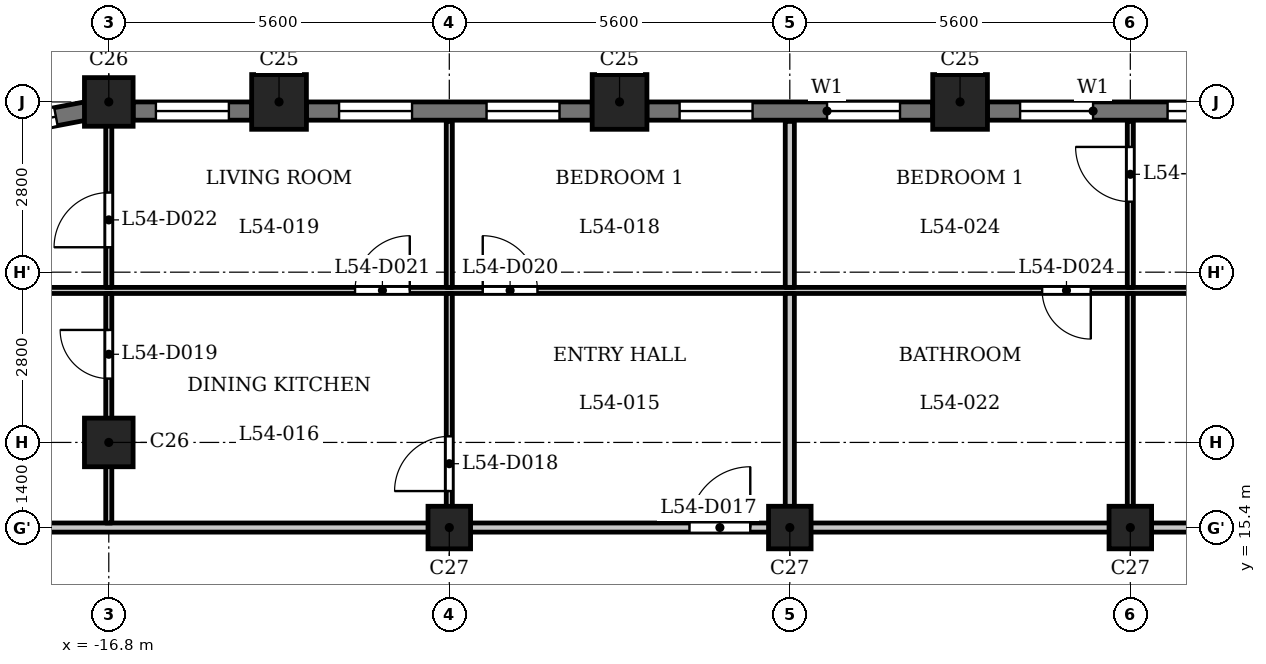
"""IFC4 building model, lengths in metres.
Left out: names, types, materials, properties, quantities, classifications, styles, units other than length and angle.
Written with IfcOpenShell. Run it as: python <this file> out.ifc"""

import sys

from ifc_helpers import new_model, si_unit, direction, frame, frame_2d, origin, origin_2d, place, context, subcontext, project, spatial, rectangle, extrude, element, fill, save


model = new_model("IFC4")
c1 = context("Model", 3, precision=1e-05, world=origin(), true_north=direction((0.0, 1.0)))
c2 = subcontext(c1, "Body", "Model", "MODEL_VIEW")
j1 = project(units=[si_unit("LENGTHUNIT", "METRE"), si_unit("PLANEANGLEUNIT", "RADIAN")], contexts=[c1])
p1 = place(None, origin())
s1 = spatial("IfcSite", under=j1, at=p1, CompositionType="ELEMENT")
p2 = place(p1, origin())
s2 = spatial("IfcBuilding", under=s1, at=p2, CompositionType="ELEMENT")
p3 = place(p2, frame((0.0, 0.0, 209.9)))
s3 = spatial("IfcBuildingStorey", under=s2, at=p3, CompositionType="ELEMENT", Elevation=209.9)
for number, where, z_axis, x_axis in (
    (1, (-2.8, 22.4, 0.0), (0.0, 0.0, 1.0), (1.0, 0.0, 0.0)),
    (2, (-8.4, 22.4, 0.0), (0.0, 0.0, 1.0), (1.0, 0.0, 0.0)),
    (3, (-14.0, 22.4, 0.0), (0.0, 0.0, 1.0), (1.0, 0.0, 0.0)),
):
    element("IfcColumn", number, at=place(p3, frame(where, z_axis=z_axis, x_axis=x_axis)), inside=s3, PredefinedType="COLUMN", context=c2, shape_type="SweptSolid", body=[
        extrude(rectangle(XDim=0.9, YDim=0.9, at=origin_2d()), origin(), (0.0, 0.0, 1.0), 3.5),
    ])
for number, where, z_axis, x_axis in (
    (4, (-16.8, 16.8, 0.0), (0.0, 0.0, 1.0), (1.0, 0.0, 0.0)),
    (5, (-16.8, 22.4, 0.0), (0.0, 0.0, 1.0), (1.0, 0.0, 0.0)),
):
    element("IfcColumn", number, at=place(p3, frame(where, z_axis=z_axis, x_axis=x_axis)), inside=s3, PredefinedType="COLUMN", context=c2, shape_type="SweptSolid", body=[
        extrude(rectangle(XDim=0.8, YDim=0.8, at=origin_2d()), origin(), (0.0, 0.0, 1.0), 3.5),
    ])
for number, where, z_axis, x_axis in (
    (6, (-11.2, 15.4, 0.0), (0.0, 0.0, 1.0), (1.0, 0.0, 0.0)),
    (7, (-5.6, 15.4, 0.0), (0.0, 0.0, 1.0), (1.0, 0.0, 0.0)),
    (8, (0.0, 15.4, 0.0), (0.0, 0.0, 1.0), (1.0, 0.0, 0.0)),
):
    element("IfcColumn", number, at=place(p3, frame(where, z_axis=z_axis, x_axis=x_axis)), inside=s3, PredefinedType="COLUMN", context=c2, shape_type="SweptSolid", body=[
        extrude(rectangle(XDim=0.7, YDim=0.7, at=origin_2d()), origin(), (0.0, 0.0, 1.0), 3.5),
    ])
p4 = place(p3, frame((2.35, 22.25, 0.0), z_axis=(0.0, 0.0, 1.0), x_axis=(-1.0, 0.0, 0.0)))
e9 = element("IfcWall", 9, at=p4, inside=s3, PredefinedType="SOLIDWALL", context=c2, shape_type="SweptSolid", body=[
    extrude(rectangle(XDim=4.7, YDim=0.3, at=frame_2d((2.35, 0.0))), origin(), (0.0, 0.0, 1.0), 2.5),
])
p5 = place(p4, frame((0.538, 0.0, 0.6)))
e10 = element("IfcOpeningElement", 10, at=p5, cuts=e9, PredefinedType="OPENING", context=c2, shape_type="SweptSolid", body=[
    extrude(rectangle(XDim=1.2, YDim=1.55, at=frame_2d((0.6, 0.775))), frame((0.0, 0.16, 0.0), z_axis=(0.0, -1.0, 0.0), x_axis=(1.0, 0.0, 0.0)), (0.0, 0.0, 1.0), 0.32),
])
p6 = place(p4, frame((2.962, 0.0, 0.6)))
e11 = element("IfcOpeningElement", 11, at=p6, cuts=e9, PredefinedType="OPENING", context=c2, shape_type="SweptSolid", body=[
    extrude(rectangle(XDim=1.2, YDim=1.55, at=frame_2d((0.6, 0.775))), frame((0.0, 0.16, 0.0), z_axis=(0.0, -1.0, 0.0), x_axis=(1.0, 0.0, 0.0)), (0.0, 0.0, 1.0), 0.32),
])
p7 = place(p3, frame((-3.25, 22.25, 0.0), z_axis=(0.0, 0.0, 1.0), x_axis=(-1.0, 0.0, 0.0)))
e12 = element("IfcWall", 12, at=p7, inside=s3, PredefinedType="SOLIDWALL", context=c2, shape_type="SweptSolid", body=[
    extrude(rectangle(XDim=4.7, YDim=0.3, at=frame_2d((2.35, 0.0))), origin(), (0.0, 0.0, 1.0), 2.5),
])
p8 = place(p7, frame((0.538, 0.0, 0.6)))
e13 = element("IfcOpeningElement", 13, at=p8, cuts=e12, PredefinedType="OPENING", context=c2, shape_type="SweptSolid", body=[
    extrude(rectangle(XDim=1.2, YDim=1.55, at=frame_2d((0.6, 0.775))), frame((0.0, 0.16, 0.0), z_axis=(0.0, -1.0, 0.0), x_axis=(1.0, 0.0, 0.0)), (0.0, 0.0, 1.0), 0.32),
])
p9 = place(p7, frame((2.962, 0.0, 0.6)))
e14 = element("IfcOpeningElement", 14, at=p9, cuts=e12, PredefinedType="OPENING", context=c2, shape_type="SweptSolid", body=[
    extrude(rectangle(XDim=1.2, YDim=1.55, at=frame_2d((0.6, 0.775))), frame((0.0, 0.16, 0.0), z_axis=(0.0, -1.0, 0.0), x_axis=(1.0, 0.0, 0.0)), (0.0, 0.0, 1.0), 0.32),
])
p10 = place(p3, frame((-8.85, 22.25, 0.0), z_axis=(0.0, 0.0, 1.0), x_axis=(-1.0, 0.0, 0.0)))
e15 = element("IfcWall", 15, at=p10, inside=s3, PredefinedType="SOLIDWALL", context=c2, shape_type="SweptSolid", body=[
    extrude(rectangle(XDim=4.7, YDim=0.3, at=frame_2d((2.35, 0.0))), origin(), (0.0, 0.0, 1.0), 2.5),
])
p11 = place(p10, frame((0.538, 0.0, 0.6)))
e16 = element("IfcOpeningElement", 16, at=p11, cuts=e15, PredefinedType="OPENING", context=c2, shape_type="SweptSolid", body=[
    extrude(rectangle(XDim=1.2, YDim=1.55, at=frame_2d((0.6, 0.775))), frame((0.0, 0.16, 0.0), z_axis=(0.0, -1.0, 0.0), x_axis=(1.0, 0.0, 0.0)), (0.0, 0.0, 1.0), 0.32),
])
p12 = place(p10, frame((2.962, 0.0, 0.6)))
e17 = element("IfcOpeningElement", 17, at=p12, cuts=e15, PredefinedType="OPENING", context=c2, shape_type="SweptSolid", body=[
    extrude(rectangle(XDim=1.2, YDim=1.55, at=frame_2d((0.6, 0.775))), frame((0.0, 0.16, 0.0), z_axis=(0.0, -1.0, 0.0), x_axis=(1.0, 0.0, 0.0)), (0.0, 0.0, 1.0), 0.32),
])
p13 = place(p3, frame((-14.45, 22.25, 0.0), z_axis=(0.0, 0.0, 1.0), x_axis=(-1.0, 0.0, 0.0)))
e18 = element("IfcWall", 18, at=p13, inside=s3, PredefinedType="SOLIDWALL", context=c2, shape_type="SweptSolid", body=[
    extrude(rectangle(XDim=1.95, YDim=0.3, at=frame_2d((0.975, 0.0))), origin(), (0.0, 0.0, 1.0), 2.5),
])
p14 = place(p13, frame((0.375, 0.0, 0.6)))
e19 = element("IfcOpeningElement", 19, at=p14, cuts=e18, PredefinedType="OPENING", context=c2, shape_type="SweptSolid", body=[
    extrude(rectangle(XDim=1.2, YDim=1.55, at=frame_2d((0.6, 0.775))), frame((0.0, 0.16, 0.0), z_axis=(0.0, -1.0, 0.0), x_axis=(1.0, 0.0, 0.0)), (0.0, 0.0, 1.0), 0.32),
])
p15 = place(p3, frame((-17.179, 22.251, 0.0), z_axis=(0.0, 0.0, 1.0), x_axis=(-0.98230529033, -0.187286722942, 0.0)))
e20 = element("IfcWall", 20, at=p15, inside=s3, PredefinedType="SOLIDWALL", context=c2, shape_type="SweptSolid", body=[
    extrude(rectangle(XDim=1.799, YDim=0.3, at=frame_2d((0.899, 0.0))), origin(), (0.0, 0.0, 1.0), 2.5),
])
p16 = place(p15, frame((0.5, 0.0, 0.6)))
e21 = element("IfcOpeningElement", 21, at=p16, cuts=e20, PredefinedType="OPENING", context=c2, shape_type="SweptSolid", body=[
    extrude(rectangle(XDim=0.8, YDim=1.55, at=frame_2d((0.4, 0.775))), frame((0.0, 0.16, 0.0), z_axis=(0.0, -1.0, 0.0), x_axis=(1.0, 0.0, 0.0)), (0.0, 0.0, 1.0), 0.32),
])
p17 = place(p3, frame((-24.684, 15.4, 0.0), z_axis=(0.0, 0.0, 1.0), x_axis=(1.0, 0.0, 0.0)))
e22 = element("IfcWall", 22, at=p17, inside=s3, PredefinedType="PARTITIONING", context=c2, shape_type="SweptSolid", body=[
    extrude(rectangle(XDim=49.368, YDim=0.15, at=frame_2d((24.684, 0.0))), origin(), (0.0, 0.0, 1.0), 3.2),
])
p18 = place(p17, frame((17.434, 0.0, 0.0)))
e23 = element("IfcOpeningElement", 23, at=p18, cuts=e22, PredefinedType="OPENING", context=c2, shape_type="SweptSolid", body=[
    extrude(rectangle(XDim=1.0, YDim=2.1, at=frame_2d((0.5, 1.05))), frame((0.0, 0.085, 0.0), z_axis=(0.0, -1.0, 0.0), x_axis=(1.0, 0.0, 0.0)), (0.0, 0.0, 1.0), 0.17),
])
p19 = place(p17, frame((28.634, 0.0, 0.0)))
e24 = element("IfcOpeningElement", 24, at=p19, cuts=e22, PredefinedType="OPENING", context=c2, shape_type="SweptSolid", body=[
    extrude(rectangle(XDim=1.0, YDim=2.1, at=frame_2d((0.5, 1.05))), frame((0.0, 0.085, 0.0), z_axis=(0.0, -1.0, 0.0), x_axis=(1.0, 0.0, 0.0)), (0.0, 0.0, 1.0), 0.17),
])
p20 = place(p17, frame((47.225, 0.0, 0.0)))
e25 = element("IfcOpeningElement", 25, at=p20, cuts=e22, PredefinedType="OPENING", context=c2, shape_type="SweptSolid", body=[
    extrude(rectangle(XDim=1.0, YDim=2.1, at=frame_2d((0.5, 1.05))), frame((0.0, 0.085, 0.0), z_axis=(0.0, -1.0, 0.0), x_axis=(1.0, 0.0, 0.0)), (0.0, 0.0, 1.0), 0.17),
])
p21 = place(p3, frame((-22.256, 19.3, 0.0), z_axis=(0.0, 0.0, 1.0), x_axis=(1.0, 0.0, 0.0)))
e26 = element("IfcWall", 26, at=p21, inside=s3, PredefinedType="PARTITIONING", context=c2, shape_type="SweptSolid", body=[
    extrude(rectangle(XDim=44.511, YDim=0.1, at=frame_2d((22.256, 0.0))), origin(), (0.0, 0.0, 1.0), 3.2),
])
p22 = place(p21, frame((11.606, 0.0, 0.0)))
e27 = element("IfcOpeningElement", 27, at=p22, cuts=e26, PredefinedType="OPENING", context=c2, shape_type="SweptSolid", body=[
    extrude(rectangle(XDim=0.9, YDim=2.1, at=frame_2d((0.45, 1.05))), frame((0.0, 0.06, 0.0), z_axis=(0.0, -1.0, 0.0), x_axis=(1.0, 0.0, 0.0)), (0.0, 0.0, 1.0), 0.12),
])
p23 = place(p21, frame((9.506, 0.0, 0.0)))
e28 = element("IfcOpeningElement", 28, at=p23, cuts=e26, PredefinedType="OPENING", context=c2, shape_type="SweptSolid", body=[
    extrude(rectangle(XDim=0.9, YDim=2.1, at=frame_2d((0.45, 1.05))), frame((0.0, 0.06, 0.0), z_axis=(0.0, -1.0, 0.0), x_axis=(1.0, 0.0, 0.0)), (0.0, 0.0, 1.0), 0.12),
])
p24 = place(p21, frame((20.806, 0.0, 0.0)))
e29 = element("IfcOpeningElement", 29, at=p24, cuts=e26, PredefinedType="OPENING", context=c2, shape_type="SweptSolid", body=[
    extrude(rectangle(XDim=0.8, YDim=2.1, at=frame_2d((0.4, 1.05))), frame((0.0, 0.06, 0.0), z_axis=(0.0, -1.0, 0.0), x_axis=(1.0, 0.0, 0.0)), (0.0, 0.0, 1.0), 0.12),
])
p25 = place(p21, frame((26.306, 0.0, 0.0)))
e30 = element("IfcOpeningElement", 30, at=p25, cuts=e26, PredefinedType="OPENING", context=c2, shape_type="SweptSolid", body=[
    extrude(rectangle(XDim=0.9, YDim=2.1, at=frame_2d((0.45, 1.05))), frame((0.0, 0.06, 0.0), z_axis=(0.0, -1.0, 0.0), x_axis=(1.0, 0.0, 0.0)), (0.0, 0.0, 1.0), 0.12),
])
p26 = place(p21, frame((40.278, 0.0, 0.0)))
e31 = element("IfcOpeningElement", 31, at=p26, cuts=e26, PredefinedType="OPENING", context=c2, shape_type="SweptSolid", body=[
    extrude(rectangle(XDim=0.9, YDim=2.1, at=frame_2d((0.45, 1.05))), frame((0.0, 0.06, 0.0), z_axis=(0.0, -1.0, 0.0), x_axis=(1.0, 0.0, 0.0)), (0.0, 0.0, 1.0), 0.12),
])
p27 = place(p21, frame((36.756, 0.0, 0.0)))
e32 = element("IfcOpeningElement", 32, at=p27, cuts=e26, PredefinedType="OPENING", context=c2, shape_type="SweptSolid", body=[
    extrude(rectangle(XDim=0.9, YDim=2.1, at=frame_2d((0.45, 1.05))), frame((0.0, 0.06, 0.0), z_axis=(0.0, -1.0, 0.0), x_axis=(1.0, 0.0, 0.0)), (0.0, 0.0, 1.0), 0.12),
])
p28 = place(p3, frame((-16.8, 15.475, 0.0), z_axis=(0.0, 0.0, 1.0), x_axis=(0.0, 1.0, 0.0)))
e33 = element("IfcWall", 33, at=p28, inside=s3, PredefinedType="PARTITIONING", context=c2, shape_type="SweptSolid", body=[
    extrude(rectangle(XDim=3.775, YDim=0.1, at=frame_2d((1.887, 0.0))), origin(), (0.0, 0.0, 1.0), 2.55),
])
p29 = place(p28, frame((2.375, 0.0, 0.0)))
e34 = element("IfcOpeningElement", 34, at=p29, cuts=e33, PredefinedType="OPENING", context=c2, shape_type="SweptSolid", body=[
    extrude(rectangle(XDim=0.8, YDim=2.1, at=frame_2d((0.4, 1.05))), frame((0.0, 0.06, 0.0), z_axis=(0.0, -1.0, 0.0), x_axis=(1.0, 0.0, 0.0)), (0.0, 0.0, 1.0), 0.12),
])
p30 = place(p3, frame((-16.8, 19.35, 0.0), z_axis=(0.0, 0.0, 1.0), x_axis=(0.0, 1.0, 0.0)))
e35 = element("IfcWall", 35, at=p30, inside=s3, PredefinedType="PARTITIONING", context=c2, shape_type="SweptSolid", body=[
    extrude(rectangle(XDim=2.96, YDim=0.1, at=frame_2d((1.48, 0.0))), origin(), (0.0, 0.0, 1.0), 2.55),
])
p31 = place(p30, frame((0.66, 0.0, 0.0)))
e36 = element("IfcOpeningElement", 36, at=p31, cuts=e35, PredefinedType="OPENING", context=c2, shape_type="SweptSolid", body=[
    extrude(rectangle(XDim=0.9, YDim=2.1, at=frame_2d((0.45, 1.05))), frame((0.0, 0.06, 0.0), z_axis=(0.0, -1.0, 0.0), x_axis=(1.0, 0.0, 0.0)), (0.0, 0.0, 1.0), 0.12),
])
p32 = place(p3, frame((-11.2, 15.475, 0.0), z_axis=(0.0, 0.0, 1.0), x_axis=(0.0, 1.0, 0.0)))
e37 = element("IfcWall", 37, at=p32, inside=s3, PredefinedType="PARTITIONING", context=c2, shape_type="SweptSolid", body=[
    extrude(rectangle(XDim=3.775, YDim=0.1, at=frame_2d((1.887, 0.0))), origin(), (0.0, 0.0, 1.0), 3.2),
])
p33 = place(p32, frame((0.525, 0.0, 0.0)))
e38 = element("IfcOpeningElement", 38, at=p33, cuts=e37, PredefinedType="OPENING", context=c2, shape_type="SweptSolid", body=[
    extrude(rectangle(XDim=0.9, YDim=2.1, at=frame_2d((0.45, 1.05))), frame((0.0, 0.06, 0.0), z_axis=(0.0, -1.0, 0.0), x_axis=(1.0, 0.0, 0.0)), (0.0, 0.0, 1.0), 0.12),
])
p34 = place(p3, frame((-11.2, 19.35, 0.0), z_axis=(0.0, 0.0, 1.0), x_axis=(0.0, 1.0, 0.0)))
e39 = element("IfcWall", 39, at=p34, inside=s3, PredefinedType="PARTITIONING", context=c2, shape_type="SweptSolid", body=[
    extrude(rectangle(XDim=2.73, YDim=0.1, at=frame_2d((1.365, 0.0))), origin(), (0.0, 0.0, 1.0), 3.2),
])
p35 = place(p3, frame((-5.6, 15.475, 0.0), z_axis=(0.0, 0.0, 1.0), x_axis=(0.0, 1.0, 0.0)))
e40 = element("IfcWall", 40, at=p35, inside=s3, PredefinedType="PARTITIONING", context=c2, shape_type="SweptSolid", body=[
    extrude(rectangle(XDim=3.775, YDim=0.15, at=frame_2d((1.887, 0.0))), origin(), (0.0, 0.0, 1.0), 3.2),
])
p36 = place(p3, frame((-5.6, 19.35, 0.0), z_axis=(0.0, 0.0, 1.0), x_axis=(0.0, 1.0, 0.0)))
e41 = element("IfcWall", 41, at=p36, inside=s3, PredefinedType="PARTITIONING", context=c2, shape_type="SweptSolid", body=[
    extrude(rectangle(XDim=2.73, YDim=0.15, at=frame_2d((1.365, 0.0))), origin(), (0.0, 0.0, 1.0), 3.2),
])
p37 = place(p3, frame((0.0, 15.475, 0.0), z_axis=(0.0, 0.0, 1.0), x_axis=(0.0, 1.0, 0.0)))
e42 = element("IfcWall", 42, at=p37, inside=s3, PredefinedType="PARTITIONING", context=c2, shape_type="SweptSolid", body=[
    extrude(rectangle(XDim=3.775, YDim=0.1, at=frame_2d((1.887, 0.0))), origin(), (0.0, 0.0, 1.0), 3.2),
])
p38 = place(p3, frame((0.0, 19.35, 0.0), z_axis=(0.0, 0.0, 1.0), x_axis=(0.0, 1.0, 0.0)))
e43 = element("IfcWall", 43, at=p38, inside=s3, PredefinedType="PARTITIONING", context=c2, shape_type="SweptSolid", body=[
    extrude(rectangle(XDim=2.73, YDim=0.1, at=frame_2d((1.365, 0.0))), origin(), (0.0, 0.0, 1.0), 3.2),
])
p39 = place(p38, frame((1.41, 0.0, 0.0)))
e44 = element("IfcOpeningElement", 44, at=p39, cuts=e43, PredefinedType="OPENING", context=c2, shape_type="SweptSolid", body=[
    extrude(rectangle(XDim=0.9, YDim=2.1, at=frame_2d((0.45, 1.05))), frame((0.0, 0.06, 0.0), z_axis=(0.0, -1.0, 0.0), x_axis=(1.0, 0.0, 0.0)), (0.0, 0.0, 1.0), 0.12),
])
p40 = place(p18, origin())
e45 = element("IfcDoor", 45, at=p40, inside=s3, OperationType="SINGLE_SWING_LEFT", PredefinedType="DOOR", context=c2, shape_type="SweptSolid", body=[
    extrude(rectangle(XDim=1.0, YDim=2.1, at=frame_2d((0.5, 1.05))), frame((0.0, 0.025, 0.0), z_axis=(0.0, -1.0, 0.0), x_axis=(1.0, 0.0, 0.0)), (0.0, 0.0, 1.0), 0.05),
])
fill(e23, e45)
p41 = place(p33, origin())
e46 = element("IfcDoor", 46, at=p41, inside=s3, OperationType="SINGLE_SWING_RIGHT", PredefinedType="DOOR", context=c2, shape_type="SweptSolid", body=[
    extrude(rectangle(XDim=0.9, YDim=2.1, at=frame_2d((0.45, 1.05))), frame((0.0, 0.025, 0.0), z_axis=(0.0, -1.0, 0.0), x_axis=(1.0, 0.0, 0.0)), (0.0, 0.0, 1.0), 0.05),
])
fill(e38, e46)
p42 = place(p29, origin())
e47 = element("IfcDoor", 47, at=p42, inside=s3, OperationType="SINGLE_SWING_LEFT", PredefinedType="DOOR", context=c2, shape_type="SweptSolid", body=[
    extrude(rectangle(XDim=0.8, YDim=2.1, at=frame_2d((0.4, 1.05))), frame((0.0, 0.025, 0.0), z_axis=(0.0, -1.0, 0.0), x_axis=(1.0, 0.0, 0.0)), (0.0, 0.0, 1.0), 0.05),
])
fill(e34, e47)
p43 = place(p22, origin())
e48 = element("IfcDoor", 48, at=p43, inside=s3, OperationType="SINGLE_SWING_RIGHT", PredefinedType="DOOR", context=c2, shape_type="SweptSolid", body=[
    extrude(rectangle(XDim=0.9, YDim=2.1, at=frame_2d((0.45, 1.05))), frame((0.0, 0.025, 0.0), z_axis=(0.0, -1.0, 0.0), x_axis=(1.0, 0.0, 0.0)), (0.0, 0.0, 1.0), 0.05),
])
fill(e27, e48)
p44 = place(p23, origin())
e49 = element("IfcDoor", 49, at=p44, inside=s3, OperationType="SINGLE_SWING_LEFT", PredefinedType="DOOR", context=c2, shape_type="SweptSolid", body=[
    extrude(rectangle(XDim=0.9, YDim=2.1, at=frame_2d((0.45, 1.05))), frame((0.0, 0.025, 0.0), z_axis=(0.0, -1.0, 0.0), x_axis=(1.0, 0.0, 0.0)), (0.0, 0.0, 1.0), 0.05),
])
fill(e28, e49)
p45 = place(p31, origin())
e50 = element("IfcDoor", 50, at=p45, inside=s3, OperationType="SINGLE_SWING_RIGHT", PredefinedType="DOOR", context=c2, shape_type="SweptSolid", body=[
    extrude(rectangle(XDim=0.9, YDim=2.1, at=frame_2d((0.45, 1.05))), frame((0.0, 0.025, 0.0), z_axis=(0.0, -1.0, 0.0), x_axis=(1.0, 0.0, 0.0)), (0.0, 0.0, 1.0), 0.05),
])
fill(e36, e50)
p46 = place(p24, origin())
e51 = element("IfcDoor", 51, at=p46, inside=s3, OperationType="SINGLE_SWING_RIGHT", PredefinedType="DOOR", context=c2, shape_type="SweptSolid", body=[
    extrude(rectangle(XDim=0.8, YDim=2.1, at=frame_2d((0.4, 1.05))), frame((0.0, 0.025, 0.0), z_axis=(0.0, -1.0, 0.0), x_axis=(1.0, 0.0, 0.0)), (0.0, 0.0, 1.0), 0.05),
])
fill(e29, e51)
p47 = place(p39, origin())
e52 = element("IfcDoor", 52, at=p47, inside=s3, OperationType="SINGLE_SWING_LEFT", PredefinedType="DOOR", context=c2, shape_type="SweptSolid", body=[
    extrude(rectangle(XDim=0.9, YDim=2.1, at=frame_2d((0.45, 1.05))), frame((0.0, 0.025, 0.0), z_axis=(0.0, -1.0, 0.0), x_axis=(1.0, 0.0, 0.0)), (0.0, 0.0, 1.0), 0.05),
])
fill(e44, e52)
p48 = place(p5, origin())
e53 = element("IfcWindow", 53, at=p48, inside=s3, PartitioningType="SINGLE_PANEL", PredefinedType="WINDOW", context=c2, shape_type="SweptSolid", body=[
    extrude(rectangle(XDim=1.2, YDim=1.55, at=frame_2d((0.6, 0.775))), frame((0.0, 0.03, 0.0), z_axis=(0.0, -1.0, 0.0), x_axis=(1.0, 0.0, 0.0)), (0.0, 0.0, 1.0), 0.06),
])
fill(e10, e53)
p49 = place(p6, origin())
e54 = element("IfcWindow", 54, at=p49, inside=s3, PartitioningType="SINGLE_PANEL", PredefinedType="WINDOW", context=c2, shape_type="SweptSolid", body=[
    extrude(rectangle(XDim=1.2, YDim=1.55, at=frame_2d((0.6, 0.775))), frame((0.0, 0.03, 0.0), z_axis=(0.0, -1.0, 0.0), x_axis=(1.0, 0.0, 0.0)), (0.0, 0.0, 1.0), 0.06),
])
fill(e11, e54)
p50 = place(p8, origin())
e55 = element("IfcWindow", 55, at=p50, inside=s3, PartitioningType="SINGLE_PANEL", PredefinedType="WINDOW", context=c2, shape_type="SweptSolid", body=[
    extrude(rectangle(XDim=1.2, YDim=1.55, at=frame_2d((0.6, 0.775))), frame((0.0, 0.03, 0.0), z_axis=(0.0, -1.0, 0.0), x_axis=(1.0, 0.0, 0.0)), (0.0, 0.0, 1.0), 0.06),
])
fill(e13, e55)
p51 = place(p9, origin())
e56 = element("IfcWindow", 56, at=p51, inside=s3, PartitioningType="SINGLE_PANEL", PredefinedType="WINDOW", context=c2, shape_type="SweptSolid", body=[
    extrude(rectangle(XDim=1.2, YDim=1.55, at=frame_2d((0.6, 0.775))), frame((0.0, 0.03, 0.0), z_axis=(0.0, -1.0, 0.0), x_axis=(1.0, 0.0, 0.0)), (0.0, 0.0, 1.0), 0.06),
])
fill(e14, e56)
p52 = place(p11, origin())
e57 = element("IfcWindow", 57, at=p52, inside=s3, PartitioningType="SINGLE_PANEL", PredefinedType="WINDOW", context=c2, shape_type="SweptSolid", body=[
    extrude(rectangle(XDim=1.2, YDim=1.55, at=frame_2d((0.6, 0.775))), frame((0.0, 0.03, 0.0), z_axis=(0.0, -1.0, 0.0), x_axis=(1.0, 0.0, 0.0)), (0.0, 0.0, 1.0), 0.06),
])
fill(e16, e57)
p53 = place(p12, origin())
e58 = element("IfcWindow", 58, at=p53, inside=s3, PartitioningType="SINGLE_PANEL", PredefinedType="WINDOW", context=c2, shape_type="SweptSolid", body=[
    extrude(rectangle(XDim=1.2, YDim=1.55, at=frame_2d((0.6, 0.775))), frame((0.0, 0.03, 0.0), z_axis=(0.0, -1.0, 0.0), x_axis=(1.0, 0.0, 0.0)), (0.0, 0.0, 1.0), 0.06),
])
fill(e17, e58)
p54 = place(p14, origin())
e59 = element("IfcWindow", 59, at=p54, inside=s3, PartitioningType="SINGLE_PANEL", PredefinedType="WINDOW", context=c2, shape_type="SweptSolid", body=[
    extrude(rectangle(XDim=1.2, YDim=1.55, at=frame_2d((0.6, 0.775))), frame((0.0, 0.03, 0.0), z_axis=(0.0, -1.0, 0.0), x_axis=(1.0, 0.0, 0.0)), (0.0, 0.0, 1.0), 0.06),
])
fill(e19, e59)
p55 = place(p16, origin())
e60 = element("IfcWindow", 60, at=p55, inside=s3, PartitioningType="SINGLE_PANEL", PredefinedType="WINDOW", context=c2, shape_type="SweptSolid", body=[
    extrude(rectangle(XDim=0.8, YDim=1.55, at=frame_2d((0.4, 0.775))), frame((0.0, 0.03, 0.0), z_axis=(0.0, -1.0, 0.0), x_axis=(1.0, 0.0, 0.0)), (0.0, 0.0, 1.0), 0.06),
])
fill(e21, e60)
save(model, sys.argv[1])
